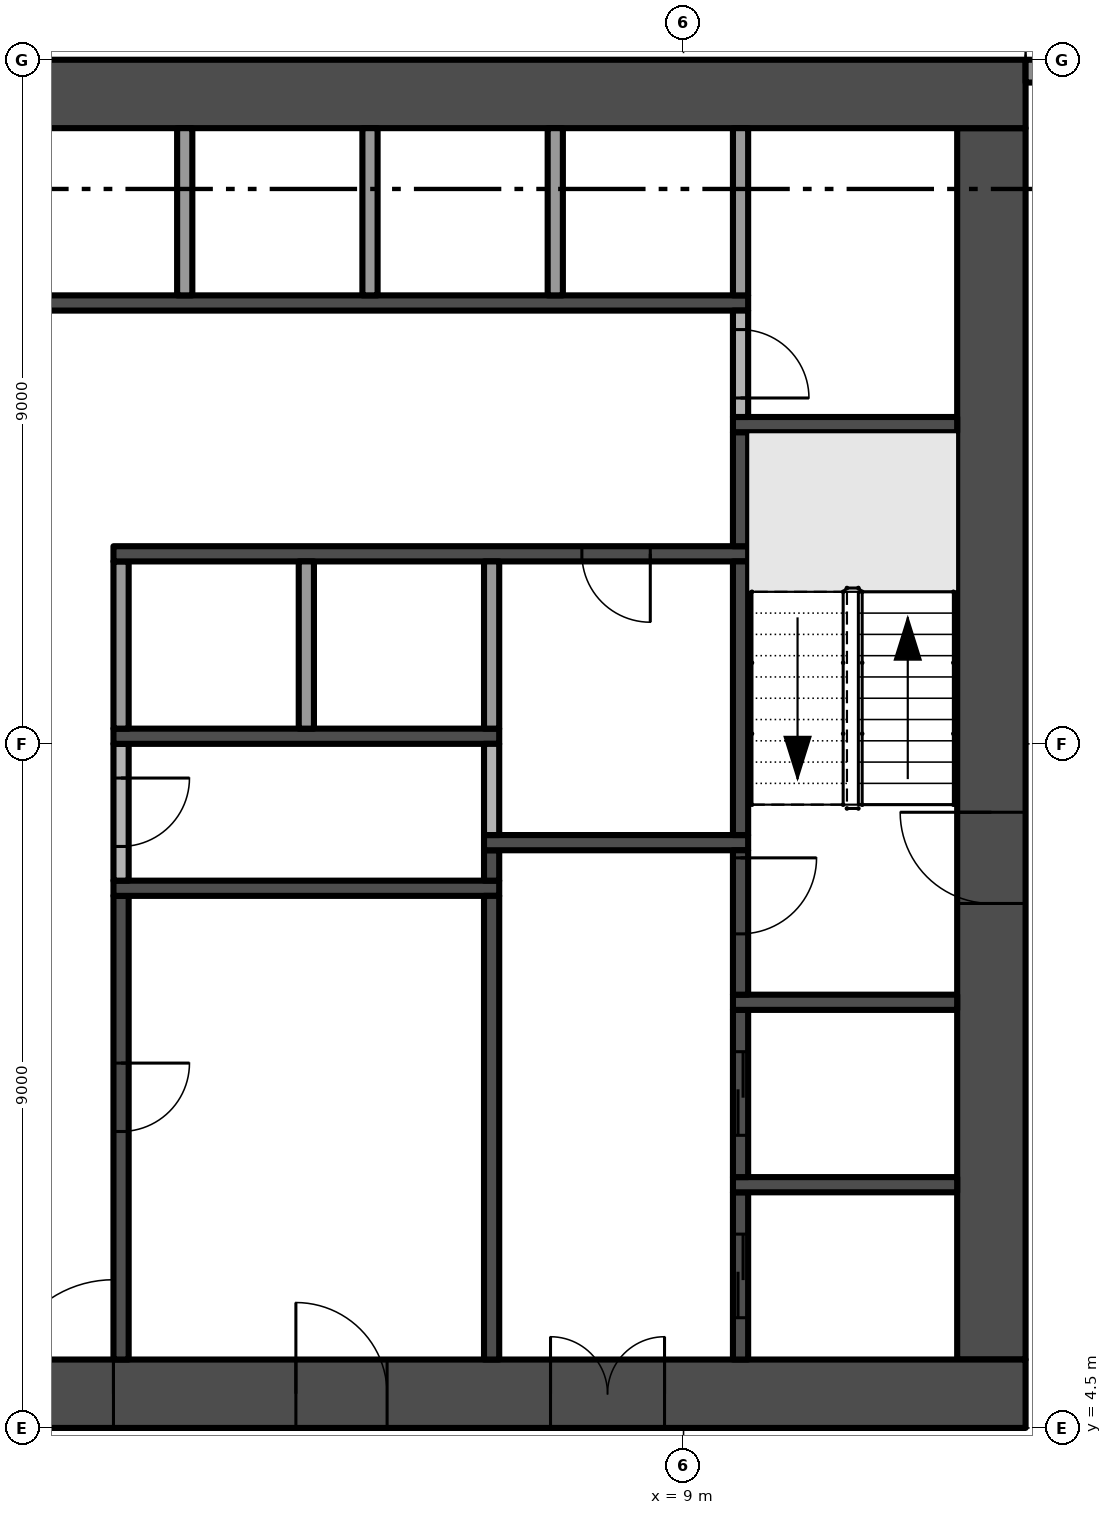
"""IFC4 building model, lengths in metres.
Left out: names, types, materials, properties, quantities, classifications, styles, units other than length and angle.
Written with IfcOpenShell. Run it as: python <this file> out.ifc"""

import sys

from ifc_helpers import new_model, si_unit, direction, frame, frame_2d, origin, place, context, subcontext, project, spatial, rectangle, extrude, element, fill, save


model = new_model("IFC4")
c1 = context("Model", 3, precision=1e-05, world=origin(), true_north=direction((0.0, 1.0)))
c2 = subcontext(c1, "Body", "Model", "MODEL_VIEW")
j1 = project(units=[si_unit("LENGTHUNIT", "METRE"), si_unit("PLANEANGLEUNIT", "RADIAN")], contexts=[c1])
p1 = place(None, origin())
s1 = spatial("IfcSite", under=j1, at=p1, CompositionType="ELEMENT")
p2 = place(p1, origin())
s2 = spatial("IfcBuilding", under=s1, at=p2, CompositionType="ELEMENT")
p3 = place(p2, frame((0.0, 0.0, 99.8)))
s3 = spatial("IfcBuildingStorey", under=s2, at=p3, CompositionType="ELEMENT", Elevation=99.8)
p4 = place(p3, frame((-13.5, 4.95, -0.3), z_axis=(0.0, 0.0, 1.0), x_axis=(1.0, 0.0, 0.0)))
e1 = element("IfcWall", 1, at=p4, inside=s3, PredefinedType="SHEAR", context=c2, shape_type="SweptSolid", body=[
    extrude(rectangle(XDim=27.0, YDim=0.9, at=frame_2d((13.5, 0.0))), origin(), (0.0, 0.0, 1.0), 3.8),
])
p5 = place(p4, frame((12.0, 0.0, 0.3)))
e2 = element("IfcOpeningElement", 2, at=p5, cuts=e1, PredefinedType="OPENING", context=c2, shape_type="SweptSolid", body=[
    extrude(rectangle(XDim=3.0, YDim=2.4, at=frame_2d((1.5, 1.2))), frame((0.0, 0.46, 0.0), z_axis=(0.0, -1.0, 0.0), x_axis=(1.0, 0.0, 0.0)), (0.0, 0.0, 1.0), 0.92),
])
p6 = place(p4, frame((4.9, 0.0, 0.3)))
e3 = element("IfcOpeningElement", 3, at=p6, cuts=e1, PredefinedType="OPENING", context=c2, shape_type="SweptSolid", body=[
    extrude(rectangle(XDim=1.2, YDim=2.2, at=frame_2d((0.6, 1.1))), frame((0.0, 0.46, 0.0), z_axis=(0.0, -1.0, 0.0), x_axis=(1.0, 0.0, 0.0)), (0.0, 0.0, 1.0), 0.92),
])
p7 = place(p4, frame((20.75, 0.0, 0.3)))
e4 = element("IfcOpeningElement", 4, at=p7, cuts=e1, PredefinedType="OPENING", context=c2, shape_type="SweptSolid", body=[
    extrude(rectangle(XDim=1.5, YDim=2.2, at=frame_2d((0.75, 1.1))), frame((0.0, 0.46, 0.0), z_axis=(0.0, -1.0, 0.0), x_axis=(1.0, 0.0, 0.0)), (0.0, 0.0, 1.0), 0.92),
])
p8 = place(p4, frame((17.4, 0.0, 0.3)))
e5 = element("IfcOpeningElement", 5, at=p8, cuts=e1, PredefinedType="OPENING", context=c2, shape_type="SweptSolid", body=[
    extrude(rectangle(XDim=1.2, YDim=2.2, at=frame_2d((0.6, 1.1))), frame((0.0, 0.46, 0.0), z_axis=(0.0, -1.0, 0.0), x_axis=(1.0, 0.0, 0.0)), (0.0, 0.0, 1.0), 0.92),
])
p9 = place(p3, frame((13.05, 5.4, -0.3), z_axis=(0.0, 0.0, 1.0), x_axis=(0.0, 1.0, 0.0)))
e6 = element("IfcWall", 6, at=p9, inside=s3, PredefinedType="SHEAR", context=c2, shape_type="SweptSolid", body=[
    extrude(rectangle(XDim=16.2, YDim=0.9, at=frame_2d((8.1, 0.0))), origin(), (0.0, 0.0, 1.0), 3.8),
])
p10 = place(p9, frame((6.0, 0.0, 0.3)))
e7 = element("IfcOpeningElement", 7, at=p10, cuts=e6, PredefinedType="OPENING", context=c2, shape_type="SweptSolid", body=[
    extrude(rectangle(XDim=1.2, YDim=2.2, at=frame_2d((0.6, 1.1))), frame((0.0, 0.46, 0.0), z_axis=(0.0, -1.0, 0.0), x_axis=(1.0, 0.0, 0.0)), (0.0, 0.0, 1.0), 0.92),
])
p11 = place(p3, frame((13.5, 22.05, -0.3), z_axis=(0.0, 0.0, 1.0), x_axis=(-1.0, 0.0, 0.0)))
e8 = element("IfcWall", 8, at=p11, inside=s3, PredefinedType="SHEAR", context=c2, shape_type="SweptSolid", body=[
    extrude(rectangle(XDim=27.0, YDim=0.9, at=frame_2d((13.5, 0.0))), origin(), (0.0, 0.0, 1.0), 3.8),
])
p12 = place(p3, frame((13.5, 22.35, 0.0), z_axis=(0.0, 0.0, 1.0), x_axis=(1.0, 0.0, 0.0)))
e9 = element("IfcWall", 9, at=p12, inside=s3, PredefinedType="SOLIDWALL", context=c2, shape_type="SweptSolid", body=[
    extrude(rectangle(XDim=3.875, YDim=0.3, at=frame_2d((1.938, 0.0))), origin(), (0.0, 0.0, 1.0), 3.5),
])
p13 = place(p12, frame((0.775, 0.0, 0.0)))
e10 = element("IfcOpeningElement", 10, at=p13, cuts=e9, PredefinedType="OPENING", context=c2, shape_type="SweptSolid", body=[
    extrude(rectangle(XDim=2.775, YDim=2.4, at=frame_2d((1.387, 1.2))), frame((0.0, 0.16, 0.0), z_axis=(0.0, -1.0, 0.0), x_axis=(1.0, 0.0, 0.0)), (0.0, 0.0, 1.0), 0.32),
])
p14 = place(p3, frame((-9.85, 19.3, 0.0), z_axis=(0.0, 0.0, 1.0), x_axis=(1.0, 0.0, 0.0)))
e11 = element("IfcWall", 11, at=p14, inside=s3, PredefinedType="SHEAR", context=c2, shape_type="SweptSolid", body=[
    extrude(rectangle(XDim=19.7, YDim=0.2, at=frame_2d((9.85, 0.0))), origin(), (0.0, 0.0, 1.0), 3.5),
])
p15 = place(p14, frame((0.769, 0.0, 0.0)))
e12 = element("IfcOpeningElement", 12, at=p15, cuts=e11, PredefinedType="OPENING", context=c2, shape_type="SweptSolid", body=[
    extrude(rectangle(XDim=1.1, YDim=2.1, at=frame_2d((0.55, 1.05))), frame((0.0, 0.11, 0.0), z_axis=(0.0, -1.0, 0.0), x_axis=(1.0, 0.0, 0.0)), (0.0, 0.0, 1.0), 0.22),
])
p16 = place(p14, frame((3.206, 0.0, 0.0)))
e13 = element("IfcOpeningElement", 13, at=p16, cuts=e11, PredefinedType="OPENING", context=c2, shape_type="SweptSolid", body=[
    extrude(rectangle(XDim=1.1, YDim=2.1, at=frame_2d((0.55, 1.05))), frame((0.0, 0.11, 0.0), z_axis=(0.0, -1.0, 0.0), x_axis=(1.0, 0.0, 0.0)), (0.0, 0.0, 1.0), 0.22),
])
p17 = place(p14, frame((5.644, 0.0, 0.0)))
e14 = element("IfcOpeningElement", 14, at=p17, cuts=e11, PredefinedType="OPENING", context=c2, shape_type="SweptSolid", body=[
    extrude(rectangle(XDim=1.1, YDim=2.1, at=frame_2d((0.55, 1.05))), frame((0.0, 0.11, 0.0), z_axis=(0.0, -1.0, 0.0), x_axis=(1.0, 0.0, 0.0)), (0.0, 0.0, 1.0), 0.22),
])
p18 = place(p14, frame((8.081, 0.0, 0.0)))
e15 = element("IfcOpeningElement", 15, at=p18, cuts=e11, PredefinedType="OPENING", context=c2, shape_type="SweptSolid", body=[
    extrude(rectangle(XDim=1.1, YDim=2.1, at=frame_2d((0.55, 1.05))), frame((0.0, 0.11, 0.0), z_axis=(0.0, -1.0, 0.0), x_axis=(1.0, 0.0, 0.0)), (0.0, 0.0, 1.0), 0.22),
])
p19 = place(p3, frame((1.6, 11.5, 0.0), z_axis=(0.0, 0.0, 1.0), x_axis=(0.0, -1.0, 0.0)))
e16 = element("IfcWall", 16, at=p19, inside=s3, PredefinedType="SHEAR", context=c2, shape_type="SweptSolid", body=[
    extrude(rectangle(XDim=6.1, YDim=0.2, at=frame_2d((3.05, 0.0))), origin(), (0.0, 0.0, 1.0), 3.5),
])
p20 = place(p19, frame((2.2, 0.0, 0.0)))
e17 = element("IfcOpeningElement", 17, at=p20, cuts=e16, PredefinedType="OPENING", context=c2, shape_type="SweptSolid", body=[
    extrude(rectangle(XDim=0.9, YDim=2.1, at=frame_2d((0.45, 1.05))), frame((0.0, 0.11, 0.0), z_axis=(0.0, -1.0, 0.0), x_axis=(1.0, 0.0, 0.0)), (0.0, 0.0, 1.0), 0.22),
])
p21 = place(p3, frame((1.5, 11.6, 0.0), z_axis=(0.0, 0.0, 1.0), x_axis=(1.0, 0.0, 0.0)))
e18 = element("IfcWall", 18, at=p21, inside=s3, PredefinedType="SHEAR", context=c2, shape_type="SweptSolid", body=[
    extrude(rectangle(XDim=5.075, YDim=0.2, at=frame_2d((2.538, 0.0))), origin(), (0.0, 0.0, 1.0), 3.5),
])
p22 = place(p3, frame((1.6, 13.5, 0.0), z_axis=(0.0, 0.0, 1.0), x_axis=(0.0, -1.0, 0.0)))
e19 = element("IfcWall", 19, at=p22, inside=s3, PredefinedType="PARTITIONING", context=c2, shape_type="SweptSolid", body=[
    extrude(rectangle(XDim=1.8, YDim=0.2, at=frame_2d((0.9, 0.0))), origin(), (0.0, 0.0, 1.0), 3.5),
])
p23 = place(p22, frame((0.45, 0.0, 0.0)))
e20 = element("IfcOpeningElement", 20, at=p23, cuts=e19, PredefinedType="OPENING", context=c2, shape_type="SweptSolid", body=[
    extrude(rectangle(XDim=0.9, YDim=2.1, at=frame_2d((0.45, 1.05))), frame((0.0, 0.11, 0.0), z_axis=(0.0, -1.0, 0.0), x_axis=(1.0, 0.0, 0.0)), (0.0, 0.0, 1.0), 0.22),
])
p24 = place(p3, frame((1.5, 13.6, 0.0), z_axis=(0.0, 0.0, 1.0), x_axis=(1.0, 0.0, 0.0)))
e21 = element("IfcWall", 21, at=p24, inside=s3, PredefinedType="SHEAR", context=c2, shape_type="SweptSolid", body=[
    extrude(rectangle(XDim=5.075, YDim=0.2, at=frame_2d((2.538, 0.0))), origin(), (0.0, 0.0, 1.0), 3.5),
])
p25 = place(p3, frame((1.6, 13.7, 0.0), z_axis=(0.0, 0.0, 1.0), x_axis=(0.0, 1.0, 0.0)))
e22 = element("IfcWall", 22, at=p25, inside=s3, PredefinedType="PARTITIONING", context=c2, shape_type="SweptSolid", body=[
    extrude(rectangle(XDim=2.2, YDim=0.2, at=frame_2d((1.1, 0.0))), origin(), (0.0, 0.0, 1.0), 3.5),
])
p26 = place(p3, frame((9.85, 16.0, 0.0), z_axis=(0.0, 0.0, 1.0), x_axis=(-1.0, 0.0, 0.0)))
e23 = element("IfcWall", 23, at=p26, inside=s3, PredefinedType="SHEAR", context=c2, shape_type="SweptSolid", body=[
    extrude(rectangle(XDim=8.35, YDim=0.2, at=frame_2d((4.175, 0.0))), origin(), (0.0, 0.0, 1.0), 3.5),
])
p27 = place(p26, frame((1.288, 0.0, 0.0)))
e24 = element("IfcOpeningElement", 24, at=p27, cuts=e23, PredefinedType="OPENING", context=c2, shape_type="SweptSolid", body=[
    extrude(rectangle(XDim=0.9, YDim=2.1, at=frame_2d((0.45, 1.05))), frame((0.0, 0.11, 0.0), z_axis=(0.0, -1.0, 0.0), x_axis=(1.0, 0.0, 0.0)), (0.0, 0.0, 1.0), 0.22),
])
for number, where, z_axis, x_axis in (
    (25, (2.438, 19.4, 0.0), (0.0, 0.0, 1.0), (0.0, 1.0, 0.0)),
    (26, (4.037, 13.7, 0.0), (0.0, 0.0, 1.0), (0.0, 1.0, 0.0)),
    (27, (4.875, 19.4, 0.0), (0.0, 0.0, 1.0), (0.0, 1.0, 0.0)),
):
    element("IfcWall", number, at=place(p3, frame(where, z_axis=z_axis, x_axis=x_axis)), inside=s3, PredefinedType="PARTITIONING", context=c2, shape_type="SweptSolid", body=[
        extrude(rectangle(XDim=2.2, YDim=0.2, at=frame_2d((1.1, 0.0))), origin(), (0.0, 0.0, 1.0), 3.5),
    ])
p28 = place(p3, frame((6.475, 5.4, 0.0), z_axis=(0.0, 0.0, 1.0), x_axis=(0.0, 1.0, 0.0)))
e28 = element("IfcWall", 28, at=p28, inside=s3, PredefinedType="SHEAR", context=c2, shape_type="SweptSolid", body=[
    extrude(rectangle(XDim=6.1, YDim=0.2, at=frame_2d((3.05, 0.0))), origin(), (0.0, 0.0, 1.0), 3.5),
])
p29 = place(p3, frame((6.475, 11.7, 0.0), z_axis=(0.0, 0.0, 1.0), x_axis=(0.0, 1.0, 0.0)))
e29 = element("IfcWall", 29, at=p29, inside=s3, PredefinedType="SHEAR", context=c2, shape_type="SweptSolid", body=[
    extrude(rectangle(XDim=0.4, YDim=0.2, at=frame_2d((0.2, 0.0))), origin(), (0.0, 0.0, 1.0), 3.5),
])
p30 = place(p3, frame((6.375, 12.2, 0.0), z_axis=(0.0, 0.0, 1.0), x_axis=(1.0, 0.0, 0.0)))
e30 = element("IfcWall", 30, at=p30, inside=s3, PredefinedType="SHEAR", context=c2, shape_type="SweptSolid", body=[
    extrude(rectangle(XDim=3.475, YDim=0.2, at=frame_2d((1.738, 0.0))), origin(), (0.0, 0.0, 1.0), 3.5),
])
p31 = place(p3, frame((6.475, 12.3, 0.0), z_axis=(0.0, 0.0, 1.0), x_axis=(0.0, 1.0, 0.0)))
e31 = element("IfcWall", 31, at=p31, inside=s3, PredefinedType="PARTITIONING", context=c2, shape_type="SweptSolid", body=[
    extrude(rectangle(XDim=1.2, YDim=0.2, at=frame_2d((0.6, 0.0))), origin(), (0.0, 0.0, 1.0), 3.5),
])
for number, where, z_axis, x_axis in (
    (32, (6.475, 13.7, 0.0), (0.0, 0.0, 1.0), (0.0, 1.0, 0.0)),
    (33, (7.312, 19.4, 0.0), (0.0, 0.0, 1.0), (0.0, 1.0, 0.0)),
):
    element("IfcWall", number, at=place(p3, frame(where, z_axis=z_axis, x_axis=x_axis)), inside=s3, PredefinedType="PARTITIONING", context=c2, shape_type="SweptSolid", body=[
        extrude(rectangle(XDim=2.2, YDim=0.2, at=frame_2d((1.1, 0.0))), origin(), (0.0, 0.0, 1.0), 3.5),
    ])
p32 = place(p3, frame((9.75, 5.4, 0.0), z_axis=(0.0, 0.0, 1.0), x_axis=(0.0, 1.0, 0.0)))
e34 = element("IfcWall", 34, at=p32, inside=s3, PredefinedType="SHEAR", context=c2, shape_type="SweptSolid", body=[
    extrude(rectangle(XDim=2.2, YDim=0.2, at=frame_2d((1.1, 0.0))), origin(), (0.0, 0.0, 1.0), 3.5),
])
p33 = place(p32, frame((0.55, 0.0, 0.0)))
e35 = element("IfcOpeningElement", 35, at=p33, cuts=e34, PredefinedType="OPENING", context=c2, shape_type="SweptSolid", body=[
    extrude(rectangle(XDim=1.1, YDim=2.1, at=frame_2d((0.55, 1.05))), frame((0.0, 0.11, 0.0), z_axis=(0.0, -1.0, 0.0), x_axis=(1.0, 0.0, 0.0)), (0.0, 0.0, 1.0), 0.22),
])
p34 = place(p3, frame((9.65, 7.7, 0.0), z_axis=(0.0, 0.0, 1.0), x_axis=(1.0, 0.0, 0.0)))
e36 = element("IfcWall", 36, at=p34, inside=s3, PredefinedType="SHEAR", context=c2, shape_type="SweptSolid", body=[
    extrude(rectangle(XDim=2.95, YDim=0.2, at=frame_2d((1.475, 0.0))), origin(), (0.0, 0.0, 1.0), 3.5),
])
p35 = place(p3, frame((9.75, 7.8, 0.0), z_axis=(0.0, 0.0, 1.0), x_axis=(0.0, 1.0, 0.0)))
e37 = element("IfcWall", 37, at=p35, inside=s3, PredefinedType="SHEAR", context=c2, shape_type="SweptSolid", body=[
    extrude(rectangle(XDim=2.2, YDim=0.2, at=frame_2d((1.1, 0.0))), origin(), (0.0, 0.0, 1.0), 3.5),
])
p36 = place(p35, frame((0.55, 0.0, 0.0)))
e38 = element("IfcOpeningElement", 38, at=p36, cuts=e37, PredefinedType="OPENING", context=c2, shape_type="SweptSolid", body=[
    extrude(rectangle(XDim=1.1, YDim=2.1, at=frame_2d((0.55, 1.05))), frame((0.0, 0.11, 0.0), z_axis=(0.0, -1.0, 0.0), x_axis=(1.0, 0.0, 0.0)), (0.0, 0.0, 1.0), 0.22),
])
p37 = place(p3, frame((9.65, 10.1, 0.0), z_axis=(0.0, 0.0, 1.0), x_axis=(1.0, 0.0, 0.0)))
e39 = element("IfcWall", 39, at=p37, inside=s3, PredefinedType="SHEAR", context=c2, shape_type="SweptSolid", body=[
    extrude(rectangle(XDim=2.95, YDim=0.2, at=frame_2d((1.475, 0.0))), origin(), (0.0, 0.0, 1.0), 3.5),
])
p38 = place(p3, frame((9.75, 12.1, 0.0), z_axis=(0.0, 0.0, 1.0), x_axis=(0.0, -1.0, 0.0)))
e40 = element("IfcWall", 40, at=p38, inside=s3, PredefinedType="SHEAR", context=c2, shape_type="SweptSolid", body=[
    extrude(rectangle(XDim=1.9, YDim=0.2, at=frame_2d((0.95, 0.0))), origin(), (0.0, 0.0, 1.0), 3.5),
])
p39 = place(p38, frame((0.1, 0.0, 0.0)))
e41 = element("IfcOpeningElement", 41, at=p39, cuts=e40, PredefinedType="OPENING", context=c2, shape_type="SweptSolid", body=[
    extrude(rectangle(XDim=1.0, YDim=2.2, at=frame_2d((0.5, 1.1))), frame((0.0, 0.11, 0.0), z_axis=(0.0, -1.0, 0.0), x_axis=(1.0, 0.0, 0.0)), (0.0, 0.0, 1.0), 0.22),
])
p40 = place(p3, frame((9.75, 12.3, 0.0), z_axis=(0.0, 0.0, 1.0), x_axis=(0.0, 1.0, 0.0)))
e42 = element("IfcWall", 42, at=p40, inside=s3, PredefinedType="SHEAR", context=c2, shape_type="SweptSolid", body=[
    extrude(rectangle(XDim=3.6, YDim=0.2, at=frame_2d((1.8, 0.0))), origin(), (0.0, 0.0, 1.0), 3.5),
])
p41 = place(p3, frame((9.75, 16.1, 0.0), z_axis=(0.0, 0.0, 1.0), x_axis=(0.0, 1.0, 0.0)))
e43 = element("IfcWall", 43, at=p41, inside=s3, PredefinedType="SHEAR", context=c2, shape_type="SweptSolid", body=[
    extrude(rectangle(XDim=1.5, YDim=0.2, at=frame_2d((0.75, 0.0))), origin(), (0.0, 0.0, 1.0), 3.5),
])
p42 = place(p3, frame((9.65, 17.7, 0.0), z_axis=(0.0, 0.0, 1.0), x_axis=(1.0, 0.0, 0.0)))
e44 = element("IfcWall", 44, at=p42, inside=s3, PredefinedType="SHEAR", context=c2, shape_type="SweptSolid", body=[
    extrude(rectangle(XDim=2.95, YDim=0.2, at=frame_2d((1.475, 0.0))), origin(), (0.0, 0.0, 1.0), 3.5),
])
p43 = place(p3, frame((9.75, 19.2, 0.0), z_axis=(0.0, 0.0, 1.0), x_axis=(0.0, -1.0, 0.0)))
e45 = element("IfcWall", 45, at=p43, inside=s3, PredefinedType="PARTITIONING", context=c2, shape_type="SweptSolid", body=[
    extrude(rectangle(XDim=1.4, YDim=0.2, at=frame_2d((0.7, 0.0))), origin(), (0.0, 0.0, 1.0), 3.5),
])
p44 = place(p43, frame((0.25, 0.0, 0.0)))
e46 = element("IfcOpeningElement", 46, at=p44, cuts=e45, PredefinedType="OPENING", context=c2, shape_type="SweptSolid", body=[
    extrude(rectangle(XDim=0.9, YDim=2.1, at=frame_2d((0.45, 1.05))), frame((0.0, 0.11, 0.0), z_axis=(0.0, -1.0, 0.0), x_axis=(1.0, 0.0, 0.0)), (0.0, 0.0, 1.0), 0.22),
])
p45 = place(p3, frame((9.75, 19.4, 0.0), z_axis=(0.0, 0.0, 1.0), x_axis=(0.0, 1.0, 0.0)))
e47 = element("IfcWall", 47, at=p45, inside=s3, PredefinedType="PARTITIONING", context=c2, shape_type="SweptSolid", body=[
    extrude(rectangle(XDim=2.2, YDim=0.2, at=frame_2d((1.1, 0.0))), origin(), (0.0, 0.0, 1.0), 3.5),
])
p46 = place(p5, frame((3.0, 0.0, 0.0), z_axis=(0.0, 0.0, 1.0), x_axis=(-1.0, 0.0, 0.0)))
e48 = element("IfcDoor", 48, at=p46, inside=s3, OperationType="DOUBLE_DOOR_SINGLE_SWING", PredefinedType="DOOR", context=c2, shape_type="SweptSolid", body=[
    extrude(rectangle(XDim=3.0, YDim=2.4, at=frame_2d((1.5, 1.2))), frame((0.0, 0.025, 0.0), z_axis=(0.0, -1.0, 0.0), x_axis=(1.0, 0.0, 0.0)), (0.0, 0.0, 1.0), 0.05),
])
fill(e2, e48)
p47 = place(p10, frame((1.2, 0.0, 0.0), z_axis=(0.0, 0.0, 1.0), x_axis=(-1.0, 0.0, 0.0)))
e49 = element("IfcDoor", 49, at=p47, inside=s3, OperationType="SINGLE_SWING_LEFT", PredefinedType="DOOR", context=c2, shape_type="SweptSolid", body=[
    extrude(rectangle(XDim=1.2, YDim=2.2, at=frame_2d((0.6, 1.1))), frame((0.0, 0.025, 0.0), z_axis=(0.0, -1.0, 0.0), x_axis=(1.0, 0.0, 0.0)), (0.0, 0.0, 1.0), 0.05),
])
fill(e7, e49)
p48 = place(p7, frame((1.5, 0.0, 0.0), z_axis=(0.0, 0.0, 1.0), x_axis=(-1.0, 0.0, 0.0)))
e50 = element("IfcDoor", 50, at=p48, inside=s3, OperationType="DOUBLE_DOOR_SINGLE_SWING", PredefinedType="DOOR", context=c2, shape_type="SweptSolid", body=[
    extrude(rectangle(XDim=1.5, YDim=2.2, at=frame_2d((0.75, 1.1))), frame((0.0, 0.025, 0.0), z_axis=(0.0, -1.0, 0.0), x_axis=(1.0, 0.0, 0.0)), (0.0, 0.0, 1.0), 0.05),
])
fill(e4, e50)
p49 = place(p8, frame((1.2, 0.0, 0.0), z_axis=(0.0, 0.0, 1.0), x_axis=(-1.0, 0.0, 0.0)))
e51 = element("IfcDoor", 51, at=p49, inside=s3, OperationType="SINGLE_SWING_RIGHT", PredefinedType="DOOR", context=c2, shape_type="SweptSolid", body=[
    extrude(rectangle(XDim=1.2, YDim=2.2, at=frame_2d((0.6, 1.1))), frame((0.0, 0.025, 0.0), z_axis=(0.0, -1.0, 0.0), x_axis=(1.0, 0.0, 0.0)), (0.0, 0.0, 1.0), 0.05),
])
fill(e5, e51)
p50 = place(p39, origin())
e52 = element("IfcDoor", 52, at=p50, inside=s3, OperationType="SINGLE_SWING_LEFT", PredefinedType="DOOR", context=c2, shape_type="SweptSolid", body=[
    extrude(rectangle(XDim=1.0, YDim=2.2, at=frame_2d((0.5, 1.1))), frame((0.0, 0.025, 0.0), z_axis=(0.0, -1.0, 0.0), x_axis=(1.0, 0.0, 0.0)), (0.0, 0.0, 1.0), 0.05),
])
fill(e41, e52)
p51 = place(p33, origin())
e53 = element("IfcDoor", 53, at=p51, inside=s3, OperationType="SLIDING_TO_RIGHT", PredefinedType="DOOR", context=c2, shape_type="SweptSolid", body=[
    extrude(rectangle(XDim=1.1, YDim=2.1, at=frame_2d((0.55, 1.05))), frame((0.0, 0.025, 0.0), z_axis=(0.0, -1.0, 0.0), x_axis=(1.0, 0.0, 0.0)), (0.0, 0.0, 1.0), 0.05),
])
fill(e35, e53)
p52 = place(p36, origin())
e54 = element("IfcDoor", 54, at=p52, inside=s3, OperationType="SLIDING_TO_RIGHT", PredefinedType="DOOR", context=c2, shape_type="SweptSolid", body=[
    extrude(rectangle(XDim=1.1, YDim=2.1, at=frame_2d((0.55, 1.05))), frame((0.0, 0.025, 0.0), z_axis=(0.0, -1.0, 0.0), x_axis=(1.0, 0.0, 0.0)), (0.0, 0.0, 1.0), 0.05),
])
fill(e38, e54)
p53 = place(p20, origin())
e55 = element("IfcDoor", 55, at=p53, inside=s3, OperationType="SINGLE_SWING_LEFT", PredefinedType="DOOR", context=c2, shape_type="SweptSolid", body=[
    extrude(rectangle(XDim=0.9, YDim=2.1, at=frame_2d((0.45, 1.05))), frame((0.0, 0.025, 0.0), z_axis=(0.0, -1.0, 0.0), x_axis=(1.0, 0.0, 0.0)), (0.0, 0.0, 1.0), 0.05),
])
fill(e17, e55)
p54 = place(p23, origin())
e56 = element("IfcDoor", 56, at=p54, inside=s3, OperationType="SINGLE_SWING_LEFT", PredefinedType="DOOR", context=c2, shape_type="SweptSolid", body=[
    extrude(rectangle(XDim=0.9, YDim=2.1, at=frame_2d((0.45, 1.05))), frame((0.0, 0.025, 0.0), z_axis=(0.0, -1.0, 0.0), x_axis=(1.0, 0.0, 0.0)), (0.0, 0.0, 1.0), 0.05),
])
fill(e20, e56)
p55 = place(p27, origin())
e57 = element("IfcDoor", 57, at=p55, inside=s3, OperationType="SINGLE_SWING_LEFT", PredefinedType="DOOR", context=c2, shape_type="SweptSolid", body=[
    extrude(rectangle(XDim=0.9, YDim=2.1, at=frame_2d((0.45, 1.05))), frame((0.0, 0.025, 0.0), z_axis=(0.0, -1.0, 0.0), x_axis=(1.0, 0.0, 0.0)), (0.0, 0.0, 1.0), 0.05),
])
fill(e24, e57)
p56 = place(p44, origin())
e58 = element("IfcDoor", 58, at=p56, inside=s3, OperationType="SINGLE_SWING_RIGHT", PredefinedType="DOOR", context=c2, shape_type="SweptSolid", body=[
    extrude(rectangle(XDim=0.9, YDim=2.1, at=frame_2d((0.45, 1.05))), frame((0.0, 0.025, 0.0), z_axis=(0.0, -1.0, 0.0), x_axis=(1.0, 0.0, 0.0)), (0.0, 0.0, 1.0), 0.05),
])
fill(e46, e58)
save(model, sys.argv[1])
